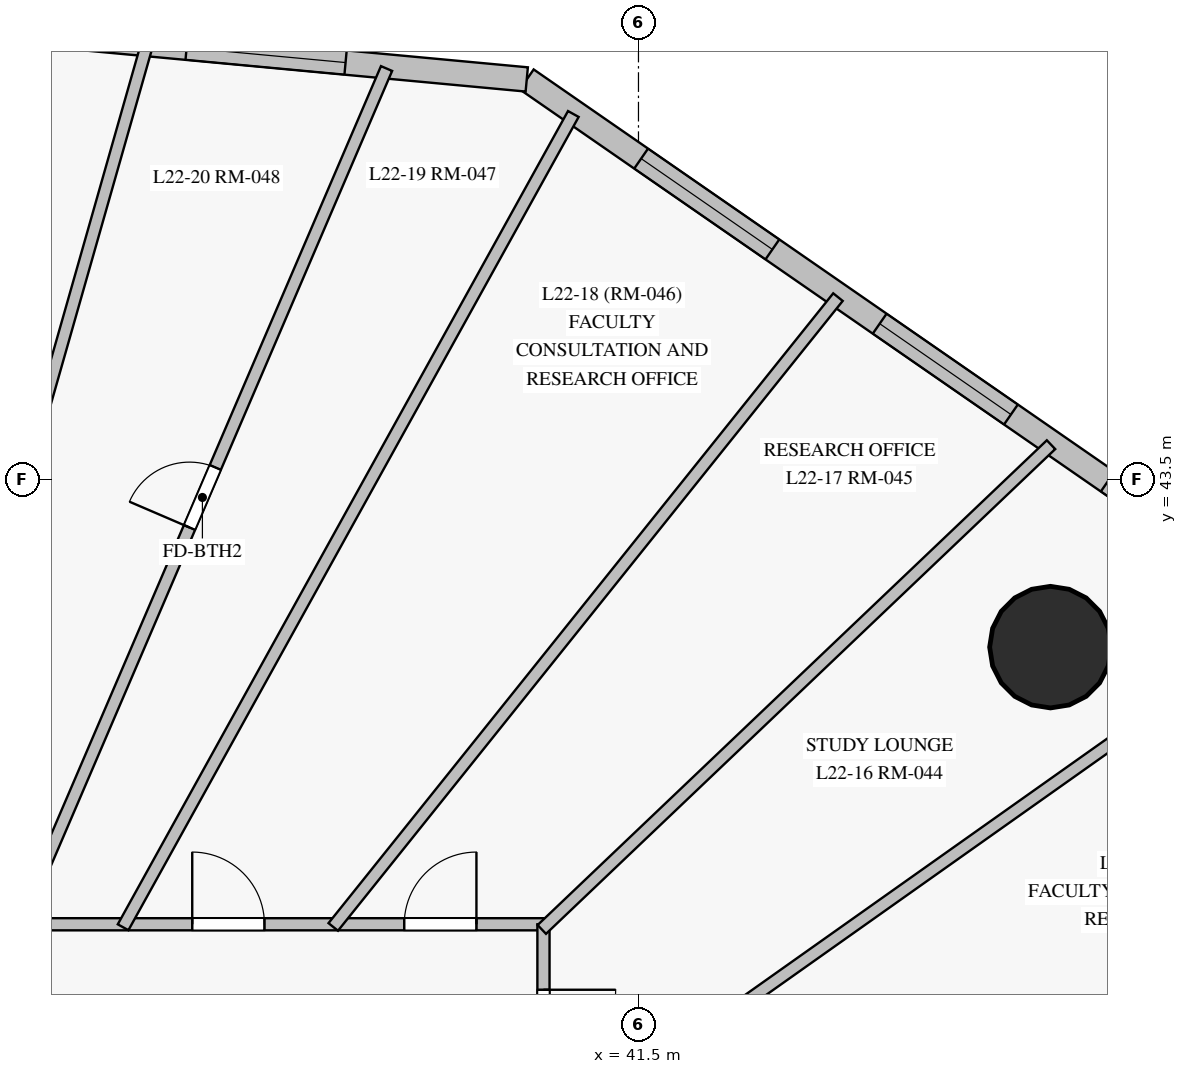
"""IFC4 building model, lengths in metres.
Left out: names, types, materials, properties, quantities, classifications, styles, units other than length and angle.
Written with IfcOpenShell. Run it as: python <this file> out.ifc"""

import sys

from ifc_helpers import new_model, si_unit, direction, frame, frame_2d, origin, origin_with_axes, origin_2d, place, context, subcontext, project, spatial, rectangle, circle, extrude, source, transform, mapped, element, fill, save


model = new_model("IFC4")
c1 = context("Model", 3, precision=1e-05, world=origin(), true_north=direction((0.0, 1.0)))
c2 = subcontext(c1, "Body", "Model", "MODEL_VIEW")
j1 = project(units=[si_unit("LENGTHUNIT", "METRE"), si_unit("PLANEANGLEUNIT", "RADIAN")], contexts=[c1])
p1 = place(None, origin())
s1 = spatial("IfcSite", under=j1, at=p1, CompositionType="ELEMENT")
p2 = place(p1, origin())
s2 = spatial("IfcBuilding", under=s1, at=p2, CompositionType="ELEMENT")
p3 = place(p2, frame((0.0, 0.0, 84.1)))
s3 = spatial("IfcBuildingStorey", under=s2, at=p3, CompositionType="ELEMENT", Elevation=84.1)
m1 = source(origin_with_axes(), c2, "Body", "SweptSolid", [
    extrude(circle(Radius=0.8, at=origin_2d()), origin(), (0.0, 0.0, 1.0), 3.6),
])
p4 = place(p3, frame((46.92, 41.296, 0.0), z_axis=(0.0, 0.0, 1.0), x_axis=(1.0, 0.0, 0.0)))
e1 = element("IfcColumn", 1, at=p4, inside=s3, PredefinedType="COLUMN", context=c2, shape_type="MappedRepresentation", body=[
    mapped(m1, transform((0.0, 0.0, 0.0), scale=1.0)),
])
p5 = place(p3, frame((50.307, 41.653, 0.0), z_axis=(0.0, 0.0, 1.0), x_axis=(-0.822301884345, 0.569051501187, 0.0)))
e2 = element("IfcWall", 2, at=p5, inside=s3, PredefinedType="SOLIDWALL", context=c2, shape_type="SweptSolid", body=[
    extrude(rectangle(XDim=12.498, YDim=0.32, at=frame_2d((6.249, 0.0))), origin(), (0.0, 0.0, 1.0), 3.325),
])
p6 = place(p5, frame((1.102, 0.0, 0.85)))
e3 = element("IfcOpeningElement", 3, at=p6, cuts=e2, PredefinedType="OPENING", context=c2, shape_type="SweptSolid", body=[
    extrude(rectangle(XDim=2.1, YDim=1.95, at=frame_2d((1.05, 0.975))), frame((0.0, 0.17, 0.0), z_axis=(0.0, -1.0, 0.0), x_axis=(1.0, 0.0, 0.0)), (0.0, 0.0, 1.0), 0.34),
])
p7 = place(p5, frame((4.751, 0.0, 0.85)))
e4 = element("IfcOpeningElement", 4, at=p7, cuts=e2, PredefinedType="OPENING", context=c2, shape_type="SweptSolid", body=[
    extrude(rectangle(XDim=2.1, YDim=1.95, at=frame_2d((1.05, 0.975))), frame((0.0, 0.17, 0.0), z_axis=(0.0, -1.0, 0.0), x_axis=(1.0, 0.0, 0.0)), (0.0, 0.0, 1.0), 0.34),
])
p8 = place(p5, frame((8.568, 0.0, 0.85)))
e5 = element("IfcOpeningElement", 5, at=p8, cuts=e2, PredefinedType="OPENING", context=c2, shape_type="SweptSolid", body=[
    extrude(rectangle(XDim=2.1, YDim=1.95, at=frame_2d((1.05, 0.975))), frame((0.0, 0.17, 0.0), z_axis=(0.0, -1.0, 0.0), x_axis=(1.0, 0.0, 0.0)), (0.0, 0.0, 1.0), 0.34),
])
p9 = place(p3, frame((40.03, 48.765, 0.0), z_axis=(0.0, 0.0, 1.0), x_axis=(-0.995690576349, 0.092737673949, 0.0)))
e6 = element("IfcWall", 6, at=p9, inside=s3, PredefinedType="SOLIDWALL", context=c2, shape_type="SweptSolid", body=[
    extrude(rectangle(XDim=10.046, YDim=0.32, at=frame_2d((5.023, 0.0))), origin(), (0.0, 0.0, 1.0), 3.325),
])
p10 = place(p9, frame((2.394, 0.0, 0.85)))
e7 = element("IfcOpeningElement", 7, at=p10, cuts=e6, PredefinedType="OPENING", context=c2, shape_type="SweptSolid", body=[
    extrude(rectangle(XDim=2.1, YDim=1.95, at=frame_2d((1.05, 0.975))), frame((0.0, 0.17, 0.0), z_axis=(0.0, -1.0, 0.0), x_axis=(1.0, 0.0, 0.0)), (0.0, 0.0, 1.0), 0.34),
])
p11 = place(p9, frame((6.311, 0.0, 0.85)))
e8 = element("IfcOpeningElement", 8, at=p11, cuts=e6, PredefinedType="OPENING", context=c2, shape_type="SweptSolid", body=[
    extrude(rectangle(XDim=2.1, YDim=1.95, at=frame_2d((1.05, 0.975))), frame((0.0, 0.17, 0.0), z_axis=(0.0, -1.0, 0.0), x_axis=(1.0, 0.0, 0.0)), (0.0, 0.0, 1.0), 0.34),
])
p12 = place(p3, frame((10.5, 37.65, 0.0), z_axis=(0.0, 0.0, 1.0), x_axis=(1.0, 0.0, 0.0)))
e9 = element("IfcWall", 9, at=p12, inside=s3, PredefinedType="PARTITIONING", context=c2, shape_type="SweptSolid", body=[
    extrude(rectangle(XDim=29.75, YDim=0.16, at=frame_2d((14.875, 0.0))), origin(), (0.0, 0.0, 1.0), 2.725),
])
p13 = place(p12, frame((27.918, 0.0, 0.0)))
e10 = element("IfcOpeningElement", 10, at=p13, cuts=e9, PredefinedType="OPENING", context=c2, shape_type="SweptSolid", body=[
    extrude(rectangle(XDim=0.95, YDim=2.15, at=frame_2d((0.475, 1.075))), frame((0.0, 0.09, 0.0), z_axis=(0.0, -1.0, 0.0), x_axis=(1.0, 0.0, 0.0)), (0.0, 0.0, 1.0), 0.18),
])
p14 = place(p12, frame((25.129, 0.0, 0.0)))
e11 = element("IfcOpeningElement", 11, at=p14, cuts=e9, PredefinedType="OPENING", context=c2, shape_type="SweptSolid", body=[
    extrude(rectangle(XDim=0.95, YDim=2.15, at=frame_2d((0.475, 1.075))), frame((0.0, 0.09, 0.0), z_axis=(0.0, -1.0, 0.0), x_axis=(1.0, 0.0, 0.0)), (0.0, 0.0, 1.0), 0.18),
])
p15 = place(p12, frame((21.748, 0.0, 0.0)))
e12 = element("IfcOpeningElement", 12, at=p15, cuts=e9, PredefinedType="OPENING", context=c2, shape_type="SweptSolid", body=[
    extrude(rectangle(XDim=0.86, YDim=2.1, at=frame_2d((0.43, 1.05))), frame((0.0, 0.09, 0.0), z_axis=(0.0, -1.0, 0.0), x_axis=(1.0, 0.0, 0.0)), (0.0, 0.0, 1.0), 0.18),
])
p16 = place(p12, frame((20.048, 0.0, 0.0)))
e13 = element("IfcOpeningElement", 13, at=p16, cuts=e9, PredefinedType="OPENING", context=c2, shape_type="SweptSolid", body=[
    extrude(rectangle(XDim=0.95, YDim=2.15, at=frame_2d((0.475, 1.075))), frame((0.0, 0.09, 0.0), z_axis=(0.0, -1.0, 0.0), x_axis=(1.0, 0.0, 0.0)), (0.0, 0.0, 1.0), 0.18),
])
p17 = place(p12, frame((17.722, 0.0, 0.0)))
e14 = element("IfcOpeningElement", 14, at=p17, cuts=e9, PredefinedType="OPENING", context=c2, shape_type="SweptSolid", body=[
    extrude(rectangle(XDim=0.95, YDim=2.15, at=frame_2d((0.475, 1.075))), frame((0.0, 0.09, 0.0), z_axis=(0.0, -1.0, 0.0), x_axis=(1.0, 0.0, 0.0)), (0.0, 0.0, 1.0), 0.18),
])
p18 = place(p12, frame((15.906, 0.0, 0.0)))
e15 = element("IfcOpeningElement", 15, at=p18, cuts=e9, PredefinedType="OPENING", context=c2, shape_type="SweptSolid", body=[
    extrude(rectangle(XDim=0.95, YDim=2.15, at=frame_2d((0.475, 1.075))), frame((0.0, 0.09, 0.0), z_axis=(0.0, -1.0, 0.0), x_axis=(1.0, 0.0, 0.0)), (0.0, 0.0, 1.0), 0.18),
])
p19 = place(p12, frame((12.735, 0.0, 0.0)))
e16 = element("IfcOpeningElement", 16, at=p19, cuts=e9, PredefinedType="OPENING", context=c2, shape_type="SweptSolid", body=[
    extrude(rectangle(XDim=0.95, YDim=2.15, at=frame_2d((0.475, 1.075))), frame((0.0, 0.09, 0.0), z_axis=(0.0, -1.0, 0.0), x_axis=(1.0, 0.0, 0.0)), (0.0, 0.0, 1.0), 0.18),
])
p20 = place(p12, frame((10.11, 0.0, 0.0)))
e17 = element("IfcOpeningElement", 17, at=p20, cuts=e9, PredefinedType="OPENING", context=c2, shape_type="SweptSolid", body=[
    extrude(rectangle(XDim=0.95, YDim=2.15, at=frame_2d((0.475, 1.075))), frame((0.0, 0.09, 0.0), z_axis=(0.0, -1.0, 0.0), x_axis=(1.0, 0.0, 0.0)), (0.0, 0.0, 1.0), 0.18),
])
p21 = place(p12, frame((8.99, 0.0, 0.0)))
e18 = element("IfcOpeningElement", 18, at=p21, cuts=e9, PredefinedType="OPENING", context=c2, shape_type="SweptSolid", body=[
    extrude(rectangle(XDim=0.95, YDim=2.15, at=frame_2d((0.475, 1.075))), frame((0.0, 0.09, 0.0), z_axis=(0.0, -1.0, 0.0), x_axis=(1.0, 0.0, 0.0)), (0.0, 0.0, 1.0), 0.18),
])
p22 = place(p12, frame((7.897, 0.0, 0.0)))
e19 = element("IfcOpeningElement", 19, at=p22, cuts=e9, PredefinedType="OPENING", context=c2, shape_type="SweptSolid", body=[
    extrude(rectangle(XDim=0.95, YDim=2.15, at=frame_2d((0.475, 1.075))), frame((0.0, 0.09, 0.0), z_axis=(0.0, -1.0, 0.0), x_axis=(1.0, 0.0, 0.0)), (0.0, 0.0, 1.0), 0.18),
])
p23 = place(p3, frame((40.25, 37.65, 0.0), z_axis=(0.0, 0.0, 1.0), x_axis=(0.0, -1.0, 0.0)))
e20 = element("IfcWall", 20, at=p23, inside=s3, PredefinedType="PARTITIONING", context=c2, shape_type="SweptSolid", body=[
    extrude(rectangle(XDim=22.3, YDim=0.16, at=frame_2d((11.15, 0.0))), origin(), (0.0, 0.0, 1.0), 2.725),
])
p24 = place(p23, frame((16.25, 0.0, 0.0)))
e21 = element("IfcOpeningElement", 21, at=p24, cuts=e20, PredefinedType="OPENING", context=c2, shape_type="SweptSolid", body=[
    extrude(rectangle(XDim=0.95, YDim=2.15, at=frame_2d((0.475, 1.075))), frame((0.0, 0.09, 0.0), z_axis=(0.0, -1.0, 0.0), x_axis=(1.0, 0.0, 0.0)), (0.0, 0.0, 1.0), 0.18),
])
p25 = place(p23, frame((11.165, 0.0, 0.0)))
e22 = element("IfcOpeningElement", 22, at=p25, cuts=e20, PredefinedType="OPENING", context=c2, shape_type="SweptSolid", body=[
    extrude(rectangle(XDim=0.95, YDim=2.15, at=frame_2d((0.475, 1.075))), frame((0.0, 0.09, 0.0), z_axis=(0.0, -1.0, 0.0), x_axis=(1.0, 0.0, 0.0)), (0.0, 0.0, 1.0), 0.18),
])
p26 = place(p23, frame((9.513, 0.0, 0.0)))
e23 = element("IfcOpeningElement", 23, at=p26, cuts=e20, PredefinedType="OPENING", context=c2, shape_type="SweptSolid", body=[
    extrude(rectangle(XDim=0.95, YDim=2.15, at=frame_2d((0.475, 1.075))), frame((0.0, 0.09, 0.0), z_axis=(0.0, -1.0, 0.0), x_axis=(1.0, 0.0, 0.0)), (0.0, 0.0, 1.0), 0.18),
])
p27 = place(p23, frame((6.94, 0.0, 0.0)))
e24 = element("IfcOpeningElement", 24, at=p27, cuts=e20, PredefinedType="OPENING", context=c2, shape_type="SweptSolid", body=[
    extrude(rectangle(XDim=0.95, YDim=2.15, at=frame_2d((0.475, 1.075))), frame((0.0, 0.09, 0.0), z_axis=(0.0, -1.0, 0.0), x_axis=(1.0, 0.0, 0.0)), (0.0, 0.0, 1.0), 0.18),
])
p28 = place(p23, frame((3.677, 0.0, 0.0)))
e25 = element("IfcOpeningElement", 25, at=p28, cuts=e20, PredefinedType="OPENING", context=c2, shape_type="SweptSolid", body=[
    extrude(rectangle(XDim=0.95, YDim=2.15, at=frame_2d((0.475, 1.075))), frame((0.0, 0.09, 0.0), z_axis=(0.0, -1.0, 0.0), x_axis=(1.0, 0.0, 0.0)), (0.0, 0.0, 1.0), 0.18),
])
p29 = place(p23, frame((0.862, 0.0, 0.0)))
e26 = element("IfcOpeningElement", 26, at=p29, cuts=e20, PredefinedType="OPENING", context=c2, shape_type="SweptSolid", body=[
    extrude(rectangle(XDim=0.95, YDim=2.15, at=frame_2d((0.475, 1.075))), frame((0.0, 0.09, 0.0), z_axis=(0.0, -1.0, 0.0), x_axis=(1.0, 0.0, 0.0)), (0.0, 0.0, 1.0), 0.18),
])
p30 = place(p3, frame((40.223, 32.01, 0.0), z_axis=(0.0, 0.0, 1.0), x_axis=(0.903036353233, 0.429564133443, 0.0)))
e27 = element("IfcWall", 27, at=p30, inside=s3, PredefinedType="PARTITIONING", context=c2, shape_type="SweptSolid", body=[
    extrude(rectangle(XDim=12.288, YDim=0.16, at=frame_2d((6.144, 0.0))), origin(), (0.0, 0.0, 1.0), 3.325),
])
p31 = place(p3, frame((33.34, 37.622, 0.0), z_axis=(0.0, 0.0, 1.0), x_axis=(0.394497394223, 0.918897059496, 0.0)))
e28 = element("IfcWall", 28, at=p31, inside=s3, PredefinedType="PARTITIONING", context=c2, shape_type="SweptSolid", body=[
    extrude(rectangle(XDim=12.282, YDim=0.16, at=frame_2d((6.141, 0.0))), origin(), (0.0, 0.0, 1.0), 3.325),
])
p32 = place(p31, frame((5.711, 0.0, 0.0)))
e29 = element("IfcOpeningElement", 29, at=p32, cuts=e28, PredefinedType="OPENING", context=c2, shape_type="SweptSolid", body=[
    extrude(rectangle(XDim=0.86, YDim=2.04, at=frame_2d((0.43, 1.02))), frame((0.0, 0.09, 0.0), z_axis=(0.0, -1.0, 0.0), x_axis=(1.0, 0.0, 0.0)), (0.0, 0.0, 1.0), 0.18),
])
p33 = place(p3, frame((34.719, 37.611, 0.0), z_axis=(0.0, 0.0, 1.0), x_axis=(0.484350809967, 0.874873872558, 0.0)))
e30 = element("IfcWall", 30, at=p33, inside=s3, PredefinedType="PARTITIONING", context=c2, shape_type="SweptSolid", body=[
    extrude(rectangle(XDim=12.229, YDim=0.16, at=frame_2d((6.115, 0.0))), origin(), (0.0, 0.0, 1.0), 3.325),
])
p34 = place(p3, frame((40.213, 34.719, 0.0), z_axis=(0.0, 0.0, 1.0), x_axis=(0.816182001631, 0.577794894589, 0.0)))
e31 = element("IfcWall", 31, at=p34, inside=s3, PredefinedType="PARTITIONING", context=c2, shape_type="SweptSolid", body=[
    extrude(rectangle(XDim=12.151, YDim=0.16, at=frame_2d((6.076, 0.0))), origin(), (0.0, 0.0, 1.0), 3.325),
])
p35 = place(p3, frame((31.726, 37.607, 0.0), z_axis=(0.0, 0.0, 1.0), x_axis=(0.273886739983, 0.9617619527, 0.0)))
e32 = element("IfcWall", 32, at=p35, inside=s3, PredefinedType="PARTITIONING", context=c2, shape_type="SweptSolid", body=[
    extrude(rectangle(XDim=12.059, YDim=0.16, at=frame_2d((6.029, 0.0))), origin(), (0.0, 0.0, 1.0), 3.325),
])
p36 = place(p3, frame((37.484, 37.615, 0.0), z_axis=(0.0, 0.0, 1.0), x_axis=(0.625362175686, 0.780334639255, 0.0)))
e33 = element("IfcWall", 33, at=p36, inside=s3, PredefinedType="PARTITIONING", context=c2, shape_type="SweptSolid", body=[
    extrude(rectangle(XDim=10.618, YDim=0.16, at=frame_2d((5.309, 0.0))), origin(), (0.0, 0.0, 1.0), 3.325),
])
p37 = place(p3, frame((40.228, 37.582, 0.0), z_axis=(0.0, 0.0, 1.0), x_axis=(0.724299857795, 0.689485109337, 0.0)))
e34 = element("IfcWall", 34, at=p37, inside=s3, PredefinedType="PARTITIONING", context=c2, shape_type="SweptSolid", body=[
    extrude(rectangle(XDim=9.25, YDim=0.16, at=frame_2d((4.625, 0.0))), origin(), (0.0, 0.0, 1.0), 3.325),
])
m2 = source(origin_with_axes(), c2, "Body", "SweptSolid", [
    extrude(rectangle(XDim=2.1, YDim=1.95, at=frame_2d((1.05, 0.975))), frame((0.0, 0.03, 0.0), z_axis=(0.0, -1.0, 0.0), x_axis=(1.0, 0.0, 0.0)), (0.0, 0.0, 1.0), 0.06),
])
p38 = place(p6, origin())
e35 = element("IfcWindow", 35, at=p38, inside=s3, PartitioningType="SINGLE_PANEL", PredefinedType="WINDOW", context=c2, shape_type="MappedRepresentation", body=[
    mapped(m2, transform((0.0, 0.0, 0.0), scale=1.0)),
])
fill(e3, e35)
p39 = place(p7, origin())
e36 = element("IfcWindow", 36, at=p39, inside=s3, PartitioningType="SINGLE_PANEL", PredefinedType="WINDOW", context=c2, shape_type="MappedRepresentation", body=[
    mapped(m2, transform((0.0, 0.0, 0.0), scale=1.0)),
])
fill(e4, e36)
p40 = place(p8, origin())
e37 = element("IfcWindow", 37, at=p40, inside=s3, PartitioningType="SINGLE_PANEL", PredefinedType="WINDOW", context=c2, shape_type="MappedRepresentation", body=[
    mapped(m2, transform((0.0, 0.0, 0.0), scale=1.0)),
])
fill(e5, e37)
p41 = place(p10, origin())
e38 = element("IfcWindow", 38, at=p41, inside=s3, PartitioningType="SINGLE_PANEL", PredefinedType="WINDOW", context=c2, shape_type="MappedRepresentation", body=[
    mapped(m2, transform((0.0, 0.0, 0.0), scale=1.0)),
])
fill(e7, e38)
m3 = source(origin_with_axes(), c2, "Body", "SweptSolid", [
    extrude(rectangle(XDim=0.95, YDim=2.15, at=frame_2d((0.475, 1.075))), frame((0.0, 0.025, 0.0), z_axis=(0.0, -1.0, 0.0), x_axis=(1.0, 0.0, 0.0)), (0.0, 0.0, 1.0), 0.05),
])
p42 = place(p29, origin())
e39 = element("IfcDoor", 39, at=p42, inside=s3, OperationType="SINGLE_SWING_LEFT", PredefinedType="DOOR", context=c2, shape_type="MappedRepresentation", body=[
    mapped(m3, transform((0.0, 0.0, 0.0), scale=1.0)),
])
fill(e26, e39)
p43 = place(p13, origin())
e40 = element("IfcDoor", 40, at=p43, inside=s3, OperationType="SINGLE_SWING_RIGHT", PredefinedType="DOOR", context=c2, shape_type="MappedRepresentation", body=[
    mapped(m3, transform((0.0, 0.0, 0.0), scale=1.0)),
])
fill(e10, e40)
p44 = place(p14, origin())
e41 = element("IfcDoor", 41, at=p44, inside=s3, OperationType="SINGLE_SWING_LEFT", PredefinedType="DOOR", context=c2, shape_type="MappedRepresentation", body=[
    mapped(m3, transform((0.0, 0.0, 0.0), scale=1.0)),
])
fill(e11, e41)
m4 = source(origin_with_axes(), c2, "Body", "SweptSolid", [
    extrude(rectangle(XDim=0.86, YDim=2.04, at=frame_2d((0.43, 1.02))), frame((0.0, 0.025, 0.0), z_axis=(0.0, -1.0, 0.0), x_axis=(1.0, 0.0, 0.0)), (0.0, 0.0, 1.0), 0.05),
])
p45 = place(p32, origin())
e42 = element("IfcDoor", 42, at=p45, inside=s3, OperationType="SINGLE_SWING_LEFT", PredefinedType="DOOR", context=c2, shape_type="MappedRepresentation", body=[
    mapped(m4, transform((0.0, 0.0, 0.0), scale=1.0)),
])
fill(e29, e42)
save(model, sys.argv[1])
